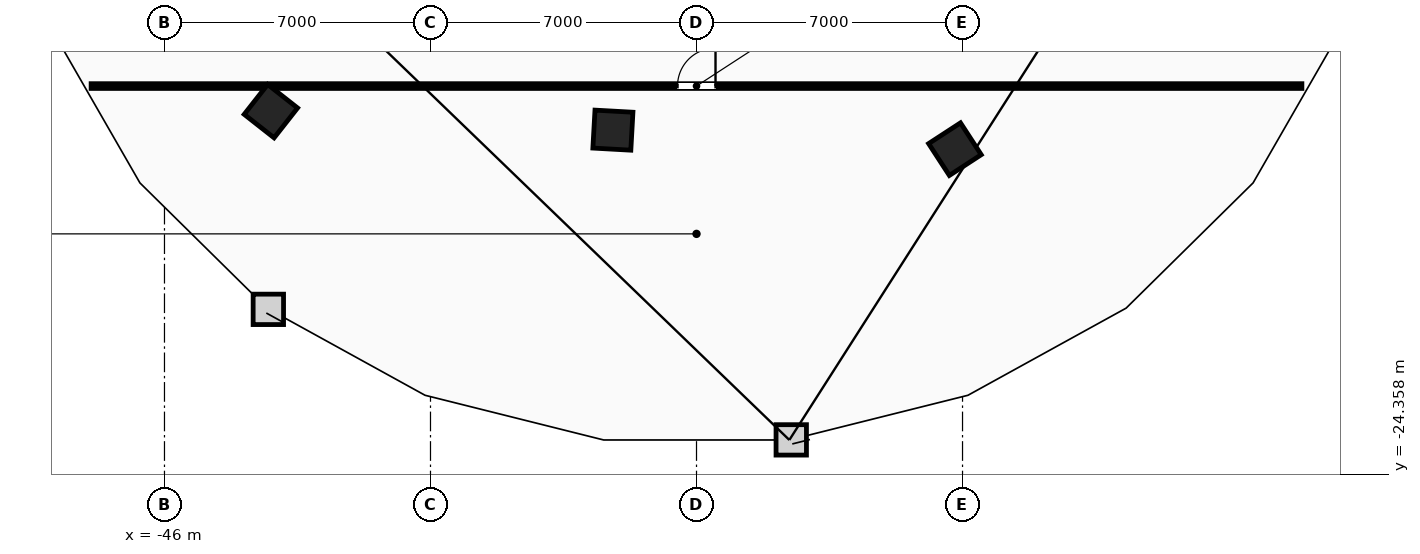
"""IFC4 building model, lengths in metres.
Left out: names, types, materials, properties, quantities, classifications, styles, units other than length and angle.
Written with IfcOpenShell. Run it as: python <this file> out.ifc"""

import sys

from ifc_helpers import new_model, si_unit, direction, frame, frame_2d, origin, origin_2d, place, context, subcontext, project, spatial, rectangle, extrude, element, fill, save


model = new_model("IFC4")
c1 = context("Model", 3, precision=1e-05, world=origin(), true_north=direction((0.0, 1.0)))
c2 = subcontext(c1, "Body", "Model", "MODEL_VIEW")
j1 = project(units=[si_unit("LENGTHUNIT", "METRE"), si_unit("PLANEANGLEUNIT", "RADIAN")], contexts=[c1])
p1 = place(None, origin())
s1 = spatial("IfcSite", under=j1, at=p1, CompositionType="ELEMENT")
p2 = place(p1, origin())
s2 = spatial("IfcBuilding", under=s1, at=p2, CompositionType="ELEMENT")
p3 = place(p2, frame((0.0, 0.0, 169.2)))
s3 = spatial("IfcBuildingStorey", under=s2, at=p3, CompositionType="ELEMENT", Elevation=169.2)
for number, where, z_axis, x_axis in (
    (1, (-43.2, -14.8, 0.0), (0.0, 0.0, 1.0), (0.786, -0.618, 0.0)),
    (2, (-34.2, -15.3, 0.0), (0.0, 0.0, 1.0), (0.998, -0.055, 0.0)),
    (3, (-25.2, -15.8, 0.0), (0.0, 0.0, 1.0), (0.838, 0.546, 0.0)),
):
    element("IfcColumn", number, at=place(p3, frame(where, z_axis=z_axis, x_axis=x_axis)), inside=s3, PredefinedType="COLUMN", context=c2, shape_type="SweptSolid", body=[
        extrude(rectangle(XDim=1.0, YDim=1.0, at=origin_2d()), origin(), (0.0, 0.0, 1.0), 3.6),
    ])
p4 = place(p3, frame((-47.93, -14.14, 0.0), z_axis=(0.0, 0.0, 1.0), x_axis=(1.0, 0.0, 0.0)))
e4 = element("IfcWall", 4, at=p4, inside=s3, PredefinedType="PARTITIONING", context=c2, shape_type="SweptSolid", body=[
    extrude(rectangle(XDim=31.86, YDim=0.125, at=frame_2d((15.93, 0.0))), origin(), (0.0, 0.0, 1.0), 3.36),
])
p5 = place(p4, frame((15.43, 0.0, 0.0)))
e5 = element("IfcOpeningElement", 5, at=p5, cuts=e4, PredefinedType="OPENING", context=c2, shape_type="SweptSolid", body=[
    extrude(rectangle(XDim=1.0, YDim=2.15, at=frame_2d((0.5, 1.075))), frame((0.0, 0.073, 0.0), z_axis=(0.0, -1.0, 0.0), x_axis=(1.0, 0.0, 0.0)), (0.0, 0.0, 1.0), 0.145),
])
p6 = place(p5, origin())
e6 = element("IfcDoor", 6, at=p6, inside=s3, OperationType="SINGLE_SWING_RIGHT", PredefinedType="DOOR", context=c2, shape_type="SweptSolid", body=[
    extrude(rectangle(XDim=1.0, YDim=2.15, at=frame_2d((0.5, 1.075))), frame((0.0, 0.025, 0.0), z_axis=(0.0, -1.0, 0.0), x_axis=(1.0, 0.0, 0.0)), (0.0, 0.0, 1.0), 0.05),
])
fill(e5, e6)
save(model, sys.argv[1])
